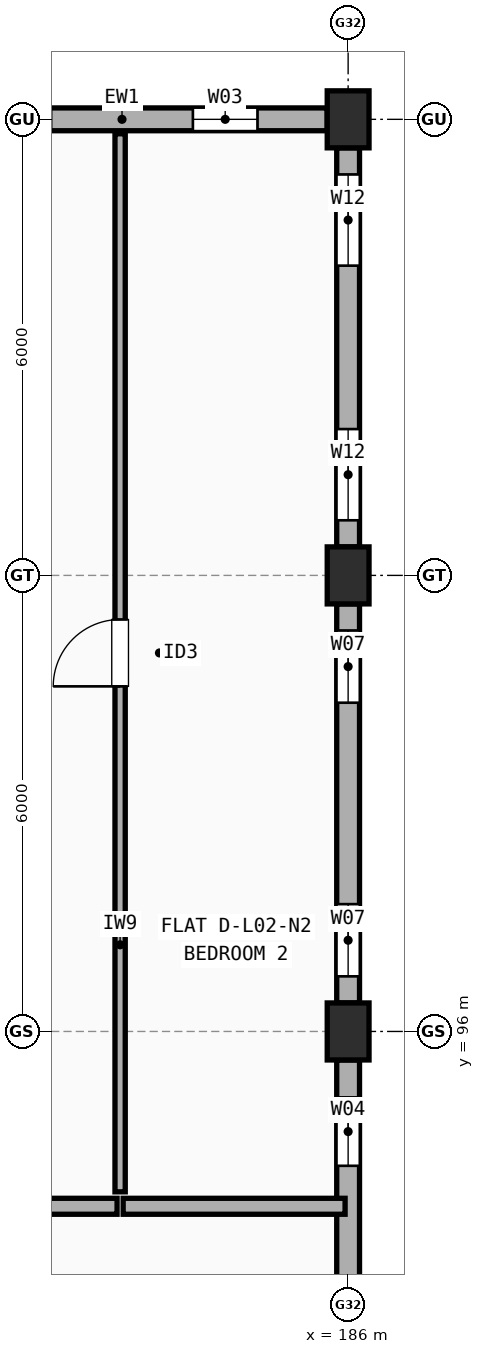
"""IFC4 building model, lengths in metres.
Left out: names, types, materials, properties, quantities, classifications, styles, units other than length and angle.
Written with IfcOpenShell. Run it as: python <this file> out.ifc"""

import sys

from ifc_helpers import new_model, si_unit, direction, frame, frame_2d, origin, origin_2d, place, context, subcontext, project, spatial, rectangle, extrude, element, fill, save


model = new_model("IFC4")
c1 = context("Model", 3, precision=1e-05, world=origin(), true_north=direction((0.0, 1.0)))
c2 = subcontext(c1, "Body", "Model", "MODEL_VIEW")
j1 = project(units=[si_unit("LENGTHUNIT", "METRE"), si_unit("PLANEANGLEUNIT", "RADIAN")], contexts=[c1])
p1 = place(None, origin())
s1 = spatial("IfcSite", under=j1, at=p1, CompositionType="ELEMENT")
p2 = place(p1, origin())
s2 = spatial("IfcBuilding", under=s1, at=p2, CompositionType="ELEMENT")
p3 = place(p2, frame((0.0, 0.0, 7.7)))
s3 = spatial("IfcBuildingStorey", under=s2, at=p3, CompositionType="ELEMENT", Elevation=7.7)
for number, where, z_axis, x_axis in (
    (1, (186.0, 96.0, 0.0), (0.0, 0.0, 1.0), (1.0, 0.0, 0.0)),
    (2, (186.0, 102.0, 0.0), (0.0, 0.0, 1.0), (1.0, 0.0, 0.0)),
    (3, (186.0, 108.0, 0.0), (0.0, 0.0, 1.0), (1.0, 0.0, 0.0)),
):
    element("IfcColumn", number, at=place(p3, frame(where, z_axis=z_axis, x_axis=x_axis)), inside=s3, PredefinedType="COLUMN", context=c2, shape_type="SweptSolid", body=[
        extrude(rectangle(XDim=0.55, YDim=0.75, at=origin_2d()), origin(), (0.0, 0.0, 1.0), 2.955),
    ])
p4 = place(p3, frame((186.0, 90.375, 0.0), z_axis=(0.0, 0.0, 1.0), x_axis=(0.0, 1.0, 0.0)))
e4 = element("IfcWall", 4, at=p4, inside=s3, PredefinedType="STANDARD", context=c2, shape_type="SweptSolid", body=[
    extrude(rectangle(XDim=5.25, YDim=0.3, at=frame_2d((2.625, 0.0))), origin(), (0.0, 0.0, 1.0), 2.437),
])
p5 = place(p4, frame((1.218, 0.0, 0.9)))
e5 = element("IfcOpeningElement", 5, at=p5, cuts=e4, PredefinedType="OPENING", context=c2, shape_type="SweptSolid", body=[
    extrude(rectangle(XDim=0.85, YDim=1.25, at=frame_2d((0.425, 0.625))), frame((0.0, 0.16, 0.0), z_axis=(0.0, -1.0, 0.0), x_axis=(1.0, 0.0, 0.0)), (0.0, 0.0, 1.0), 0.32),
])
p6 = place(p4, frame((3.857, 0.0, 0.9)))
e6 = element("IfcOpeningElement", 6, at=p6, cuts=e4, PredefinedType="OPENING", context=c2, shape_type="SweptSolid", body=[
    extrude(rectangle(XDim=0.9, YDim=1.3, at=frame_2d((0.45, 0.65))), frame((0.0, 0.16, 0.0), z_axis=(0.0, -1.0, 0.0), x_axis=(1.0, 0.0, 0.0)), (0.0, 0.0, 1.0), 0.32),
])
p7 = place(p3, frame((186.0, 96.375, 0.0), z_axis=(0.0, 0.0, 1.0), x_axis=(0.0, 1.0, 0.0)))
e7 = element("IfcWall", 7, at=p7, inside=s3, PredefinedType="STANDARD", context=c2, shape_type="SweptSolid", body=[
    extrude(rectangle(XDim=5.25, YDim=0.3, at=frame_2d((2.625, 0.0))), origin(), (0.0, 0.0, 1.0), 2.437),
])
p8 = place(p7, frame((0.35, 0.0, 0.9)))
e8 = element("IfcOpeningElement", 8, at=p8, cuts=e7, PredefinedType="OPENING", context=c2, shape_type="SweptSolid", body=[
    extrude(rectangle(XDim=0.95, YDim=1.35, at=frame_2d((0.475, 0.675))), frame((0.0, 0.16, 0.0), z_axis=(0.0, -1.0, 0.0), x_axis=(1.0, 0.0, 0.0)), (0.0, 0.0, 1.0), 0.32),
])
p9 = place(p7, frame((3.95, 0.0, 0.9)))
e9 = element("IfcOpeningElement", 9, at=p9, cuts=e7, PredefinedType="OPENING", context=c2, shape_type="SweptSolid", body=[
    extrude(rectangle(XDim=0.95, YDim=1.35, at=frame_2d((0.475, 0.675))), frame((0.0, 0.16, 0.0), z_axis=(0.0, -1.0, 0.0), x_axis=(1.0, 0.0, 0.0)), (0.0, 0.0, 1.0), 0.32),
])
p10 = place(p3, frame((186.0, 102.375, 0.0), z_axis=(0.0, 0.0, 1.0), x_axis=(0.0, 1.0, 0.0)))
e10 = element("IfcWall", 10, at=p10, inside=s3, PredefinedType="STANDARD", context=c2, shape_type="SweptSolid", body=[
    extrude(rectangle(XDim=5.25, YDim=0.3, at=frame_2d((2.625, 0.0))), origin(), (0.0, 0.0, 1.0), 2.437),
])
p11 = place(p10, frame((0.35, 0.0, 0.9)))
e11 = element("IfcOpeningElement", 11, at=p11, cuts=e10, PredefinedType="OPENING", context=c2, shape_type="SweptSolid", body=[
    extrude(rectangle(XDim=1.2, YDim=1.35, at=frame_2d((0.6, 0.675))), frame((0.0, 0.16, 0.0), z_axis=(0.0, -1.0, 0.0), x_axis=(1.0, 0.0, 0.0)), (0.0, 0.0, 1.0), 0.32),
])
p12 = place(p10, frame((3.7, 0.0, 0.9)))
e12 = element("IfcOpeningElement", 12, at=p12, cuts=e10, PredefinedType="OPENING", context=c2, shape_type="SweptSolid", body=[
    extrude(rectangle(XDim=1.2, YDim=1.35, at=frame_2d((0.6, 0.675))), frame((0.0, 0.16, 0.0), z_axis=(0.0, -1.0, 0.0), x_axis=(1.0, 0.0, 0.0)), (0.0, 0.0, 1.0), 0.32),
])
p13 = place(p3, frame((185.725, 108.0, 0.0), z_axis=(0.0, 0.0, 1.0), x_axis=(-1.0, 0.0, 0.0)))
e13 = element("IfcWall", 13, at=p13, inside=s3, PredefinedType="STANDARD", context=c2, shape_type="SweptSolid", body=[
    extrude(rectangle(XDim=5.4, YDim=0.3, at=frame_2d((2.7, 0.0))), origin(), (0.0, 0.0, 1.0), 2.437),
])
p14 = place(p13, frame((0.917, 0.0, 0.9)))
e14 = element("IfcOpeningElement", 14, at=p14, cuts=e13, PredefinedType="OPENING", context=c2, shape_type="SweptSolid", body=[
    extrude(rectangle(XDim=0.85, YDim=1.25, at=frame_2d((0.425, 0.625))), frame((0.0, 0.16, 0.0), z_axis=(0.0, -1.0, 0.0), x_axis=(1.0, 0.0, 0.0)), (0.0, 0.0, 1.0), 0.32),
])
p15 = place(p13, frame((3.633, 0.0, 0.9)))
e15 = element("IfcOpeningElement", 15, at=p15, cuts=e13, PredefinedType="OPENING", context=c2, shape_type="SweptSolid", body=[
    extrude(rectangle(XDim=0.9, YDim=1.3, at=frame_2d((0.45, 0.65))), frame((0.0, 0.16, 0.0), z_axis=(0.0, -1.0, 0.0), x_axis=(1.0, 0.0, 0.0)), (0.0, 0.0, 1.0), 0.32),
])
p16 = place(p3, frame((172.54, 93.7, 0.0), z_axis=(0.0, 0.0, 1.0), x_axis=(1.0, 0.0, 0.0)))
e16 = element("IfcWall", 16, at=p16, inside=s3, PredefinedType="SOLIDWALL", context=c2, shape_type="SweptSolid", body=[
    extrude(rectangle(XDim=10.42, YDim=0.21, at=frame_2d((5.21, 0.0))), origin(), (0.0, 0.0, 1.0), 2.955),
])
p17 = place(p16, frame((4.71, 0.0, 0.0)))
e17 = element("IfcOpeningElement", 17, at=p17, cuts=e16, PredefinedType="OPENING", context=c2, shape_type="SweptSolid", body=[
    extrude(rectangle(XDim=1.0, YDim=2.15, at=frame_2d((0.5, 1.075))), frame((0.0, 0.115, 0.0), z_axis=(0.0, -1.0, 0.0), x_axis=(1.0, 0.0, 0.0)), (0.0, 0.0, 1.0), 0.23),
])
p18 = place(p3, frame((183.04, 93.7, 0.0), z_axis=(0.0, 0.0, 1.0), x_axis=(1.0, 0.0, 0.0)))
e18 = element("IfcWall", 18, at=p18, inside=s3, PredefinedType="SOLIDWALL", context=c2, shape_type="SweptSolid", body=[
    extrude(rectangle(XDim=2.92, YDim=0.21, at=frame_2d((1.46, 0.0))), origin(), (0.0, 0.0, 1.0), 2.437),
])
p19 = place(p3, frame((183.0, 93.89, 0.0), z_axis=(0.0, 0.0, 1.0), x_axis=(0.0, 1.0, 0.0)))
e19 = element("IfcWall", 19, at=p19, inside=s3, PredefinedType="PARTITIONING", context=c2, shape_type="SweptSolid", body=[
    extrude(rectangle(XDim=13.92, YDim=0.135, at=frame_2d((6.96, 0.0))), origin(), (0.0, 0.0, 1.0), 2.387),
])
p20 = place(p19, frame((6.65, 0.0, 0.0)))
e20 = element("IfcOpeningElement", 20, at=p20, cuts=e19, PredefinedType="OPENING", context=c2, shape_type="SweptSolid", body=[
    extrude(rectangle(XDim=0.88, YDim=2.1, at=frame_2d((0.44, 1.05))), frame((0.0, 0.077, 0.0), z_axis=(0.0, -1.0, 0.0), x_axis=(1.0, 0.0, 0.0)), (0.0, 0.0, 1.0), 0.155),
])
p21 = place(p6, origin())
e21 = element("IfcWindow", 21, at=p21, inside=s3, PartitioningType="SINGLE_PANEL", PredefinedType="WINDOW", context=c2, shape_type="SweptSolid", body=[
    extrude(rectangle(XDim=0.9, YDim=1.3, at=frame_2d((0.45, 0.65))), frame((0.0, 0.03, 0.0), z_axis=(0.0, -1.0, 0.0), x_axis=(1.0, 0.0, 0.0)), (0.0, 0.0, 1.0), 0.06),
])
fill(e6, e21)
p22 = place(p8, origin())
e22 = element("IfcWindow", 22, at=p22, inside=s3, PartitioningType="SINGLE_PANEL", PredefinedType="WINDOW", context=c2, shape_type="SweptSolid", body=[
    extrude(rectangle(XDim=0.95, YDim=1.35, at=frame_2d((0.475, 0.675))), frame((0.0, 0.03, 0.0), z_axis=(0.0, -1.0, 0.0), x_axis=(1.0, 0.0, 0.0)), (0.0, 0.0, 1.0), 0.06),
])
fill(e8, e22)
p23 = place(p9, origin())
e23 = element("IfcWindow", 23, at=p23, inside=s3, PartitioningType="SINGLE_PANEL", PredefinedType="WINDOW", context=c2, shape_type="SweptSolid", body=[
    extrude(rectangle(XDim=0.95, YDim=1.35, at=frame_2d((0.475, 0.675))), frame((0.0, 0.03, 0.0), z_axis=(0.0, -1.0, 0.0), x_axis=(1.0, 0.0, 0.0)), (0.0, 0.0, 1.0), 0.06),
])
fill(e9, e23)
p24 = place(p11, origin())
e24 = element("IfcWindow", 24, at=p24, inside=s3, PartitioningType="SINGLE_PANEL", PredefinedType="WINDOW", context=c2, shape_type="SweptSolid", body=[
    extrude(rectangle(XDim=1.2, YDim=1.35, at=frame_2d((0.6, 0.675))), frame((0.0, 0.03, 0.0), z_axis=(0.0, -1.0, 0.0), x_axis=(1.0, 0.0, 0.0)), (0.0, 0.0, 1.0), 0.06),
])
fill(e11, e24)
p25 = place(p12, origin())
e25 = element("IfcWindow", 25, at=p25, inside=s3, PartitioningType="SINGLE_PANEL", PredefinedType="WINDOW", context=c2, shape_type="SweptSolid", body=[
    extrude(rectangle(XDim=1.2, YDim=1.35, at=frame_2d((0.6, 0.675))), frame((0.0, 0.03, 0.0), z_axis=(0.0, -1.0, 0.0), x_axis=(1.0, 0.0, 0.0)), (0.0, 0.0, 1.0), 0.06),
])
fill(e12, e25)
p26 = place(p14, origin())
e26 = element("IfcWindow", 26, at=p26, inside=s3, PartitioningType="SINGLE_PANEL", PredefinedType="WINDOW", context=c2, shape_type="SweptSolid", body=[
    extrude(rectangle(XDim=0.85, YDim=1.25, at=frame_2d((0.425, 0.625))), frame((0.0, 0.03, 0.0), z_axis=(0.0, -1.0, 0.0), x_axis=(1.0, 0.0, 0.0)), (0.0, 0.0, 1.0), 0.06),
])
fill(e14, e26)
p27 = place(p20, origin())
e27 = element("IfcDoor", 27, at=p27, inside=s3, OperationType="SINGLE_SWING_LEFT", PredefinedType="DOOR", context=c2, shape_type="SweptSolid", body=[
    extrude(rectangle(XDim=0.88, YDim=2.1, at=frame_2d((0.44, 1.05))), frame((0.0, 0.025, 0.0), z_axis=(0.0, -1.0, 0.0), x_axis=(1.0, 0.0, 0.0)), (0.0, 0.0, 1.0), 0.05),
])
fill(e20, e27)
save(model, sys.argv[1])
